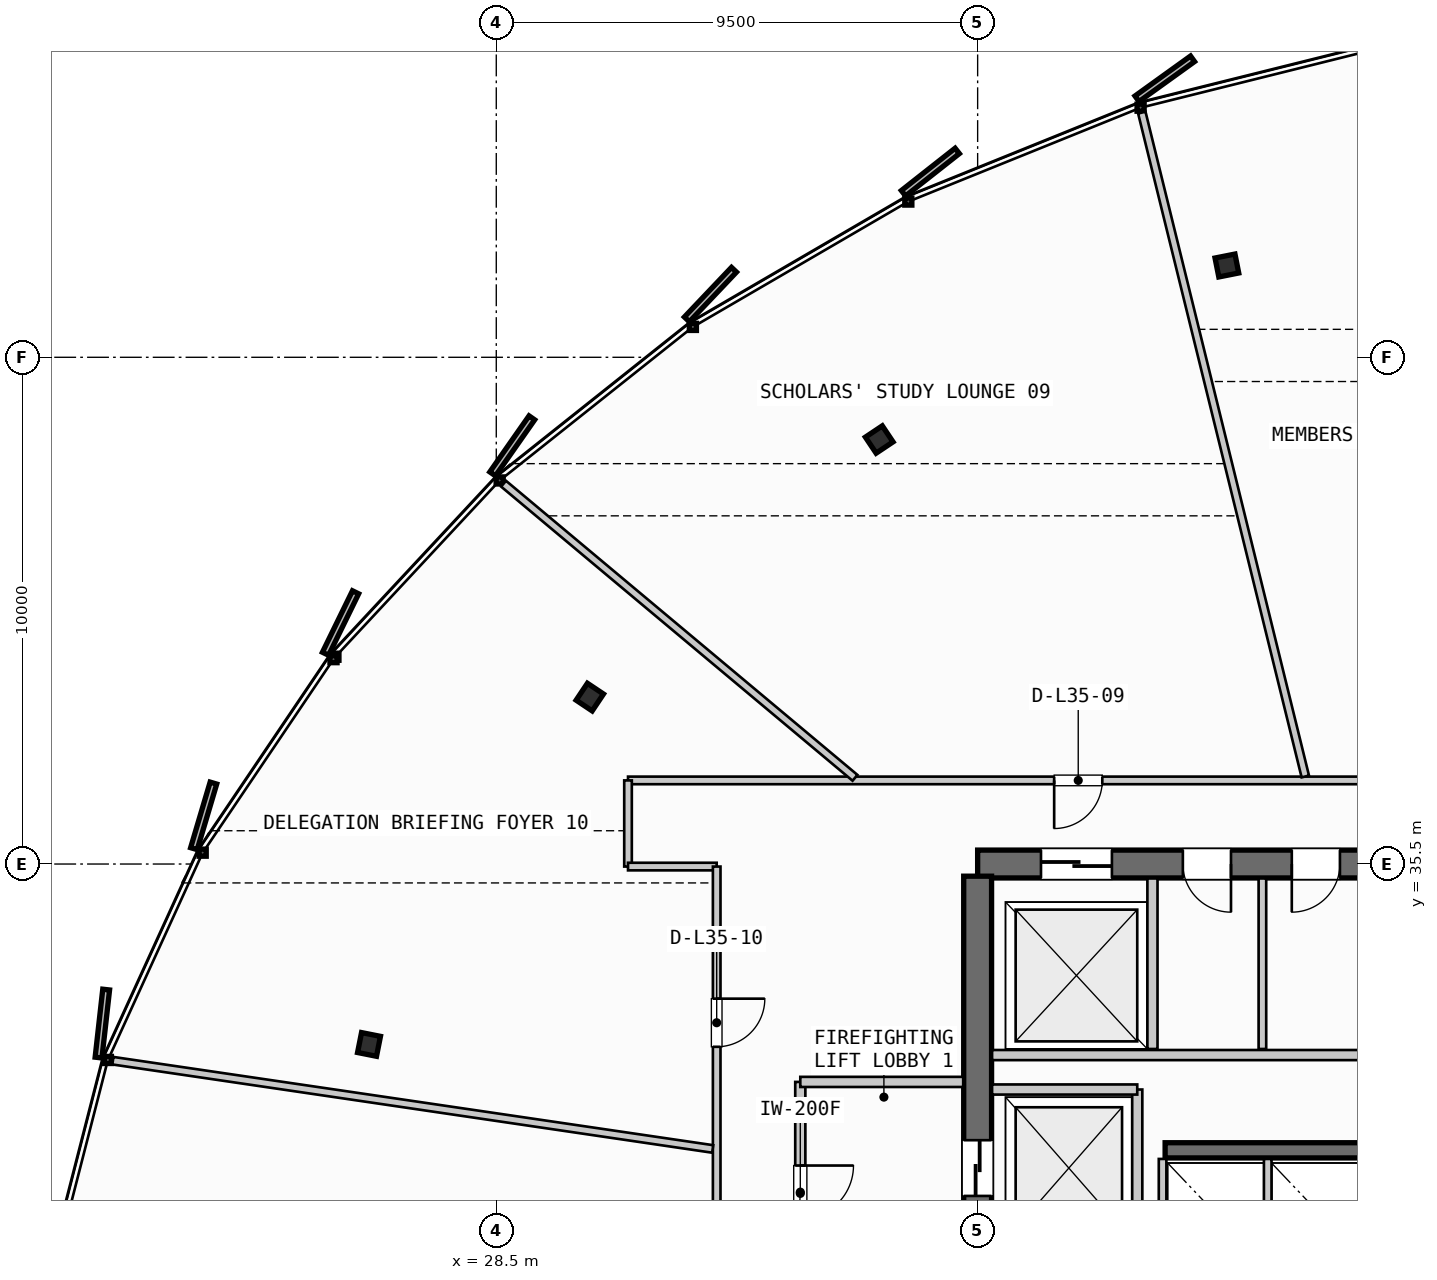
"""IFC4 building model, lengths in metres.
Left out: names, types, materials, properties, quantities, classifications, styles, units other than length and angle.
Written with IfcOpenShell. Run it as: python <this file> out.ifc"""

import sys

from ifc_helpers import new_model, si_unit, direction, frame, frame_2d, origin, origin_2d, place, context, subcontext, project, spatial, rectangle, i_section, extrude, source, transform, mapped, element, fill, save


model = new_model("IFC4")
c1 = context("Model", 3, precision=1e-05, world=origin(), true_north=direction((0.0, 1.0)))
c2 = subcontext(c1, "Body", "Model", "MODEL_VIEW")
j1 = project(units=[si_unit("LENGTHUNIT", "METRE"), si_unit("PLANEANGLEUNIT", "RADIAN")], contexts=[c1])
p1 = place(None, origin())
s1 = spatial("IfcSite", under=j1, at=p1, CompositionType="ELEMENT")
p2 = place(p1, origin())
s2 = spatial("IfcBuilding", under=s1, at=p2, CompositionType="ELEMENT")
p3 = place(p2, frame((0.0, 0.0, 139.45)))
s3 = spatial("IfcBuildingStorey", under=s2, at=p3, CompositionType="ELEMENT", Elevation=139.45)
p4 = place(p3, frame((55.6, 35.5, 0.0), z_axis=(0.0, 0.0, 1.0), x_axis=(-1.0, 0.0, 0.0)))
e1 = element("IfcWall", 1, at=p4, inside=s3, PredefinedType="SHEAR", context=c2, shape_type="SweptSolid", body=[
    extrude(rectangle(XDim=17.6, YDim=0.55, at=frame_2d((8.8, 0.0))), origin(), (0.0, 0.0, 1.0), 3.3),
])
p5 = place(p4, frame((8.05, 0.0, 0.0)))
e2 = element("IfcOpeningElement", 2, at=p5, cuts=e1, PredefinedType="OPENING", context=c2, shape_type="SweptSolid", body=[
    extrude(rectangle(XDim=1.5, YDim=2.2, at=frame_2d((0.75, 1.1))), frame((0.0, 0.285, 0.0), z_axis=(0.0, -1.0, 0.0), x_axis=(1.0, 0.0, 0.0)), (0.0, 0.0, 1.0), 0.57),
])
p6 = place(p4, frame((14.95, 0.0, 0.0)))
e3 = element("IfcOpeningElement", 3, at=p6, cuts=e1, PredefinedType="OPENING", context=c2, shape_type="SweptSolid", body=[
    extrude(rectangle(XDim=1.4, YDim=2.3, at=frame_2d((0.7, 1.15))), frame((0.0, 0.285, 0.0), z_axis=(0.0, -1.0, 0.0), x_axis=(1.0, 0.0, 0.0)), (0.0, 0.0, 1.0), 0.57),
])
p7 = place(p4, frame((12.6, 0.0, 0.0)))
e4 = element("IfcOpeningElement", 4, at=p7, cuts=e1, PredefinedType="OPENING", context=c2, shape_type="SweptSolid", body=[
    extrude(rectangle(XDim=0.95, YDim=2.15, at=frame_2d((0.475, 1.075))), frame((0.0, 0.285, 0.0), z_axis=(0.0, -1.0, 0.0), x_axis=(1.0, 0.0, 0.0)), (0.0, 0.0, 1.0), 0.57),
])
p8 = place(p4, frame((10.45, 0.0, 0.0)))
e5 = element("IfcOpeningElement", 5, at=p8, cuts=e1, PredefinedType="OPENING", context=c2, shape_type="SweptSolid", body=[
    extrude(rectangle(XDim=0.95, YDim=2.15, at=frame_2d((0.475, 1.075))), frame((0.0, 0.285, 0.0), z_axis=(0.0, -1.0, 0.0), x_axis=(1.0, 0.0, 0.0)), (0.0, 0.0, 1.0), 0.57),
])
p9 = place(p3, frame((38.0, 35.26, 0.0), z_axis=(0.0, 0.0, 1.0), x_axis=(0.0, -1.0, 0.0)))
e6 = element("IfcWall", 6, at=p9, inside=s3, PredefinedType="SHEAR", context=c2, shape_type="SweptSolid", body=[
    extrude(rectangle(XDim=14.92, YDim=0.55, at=frame_2d((7.46, 0.0))), origin(), (0.0, 0.0, 1.0), 3.3),
])
p10 = place(p9, frame((5.21, 0.0, 0.0)))
e7 = element("IfcOpeningElement", 7, at=p10, cuts=e6, PredefinedType="OPENING", context=c2, shape_type="SweptSolid", body=[
    extrude(rectangle(XDim=1.1, YDim=2.2, at=frame_2d((0.55, 1.1))), frame((0.0, 0.285, 0.0), z_axis=(0.0, -1.0, 0.0), x_axis=(1.0, 0.0, 0.0)), (0.0, 0.0, 1.0), 0.57),
])
p11 = place(p3, frame((41.7, 29.85, 0.0), z_axis=(0.0, 0.0, 1.0), x_axis=(1.0, 0.0, 0.0)))
e8 = element("IfcWall", 8, at=p11, inside=s3, PredefinedType="SHEAR", context=c2, shape_type="SweptSolid", body=[
    extrude(rectangle(XDim=4.25, YDim=0.3, at=frame_2d((2.125, 0.0))), origin(), (0.0, 0.0, 1.0), 3.3),
])
m1 = source(origin(), c2, "Body", "SweptSolid", [
    extrude(i_section(OverallWidth=0.401, OverallDepth=0.381, WebThickness=0.032, FlangeThickness=0.051, FilletRadius=0.015, at=origin_2d()), origin(), (0.0, 0.0, 1.0), 3.3),
])
for number, where, z_axis, x_axis in (
    (9, (42.919, 47.311, 0.0), (0.0, 0.0, 1.0), (-0.195, 0.981, 0.0)),
    (10, (36.058, 43.877, 0.0), (0.0, 0.0, 1.0), (-0.556, 0.831, 0.0)),
    (11, (30.346, 38.794, 0.0), (0.0, 0.0, 1.0), (-0.831, 0.556, 0.0)),
    (12, (25.989, 31.94, 0.0), (0.0, 0.0, 1.0), (-0.981, 0.195, 0.0)),
):
    element("IfcColumn", number, at=place(p3, frame(where, z_axis=z_axis, x_axis=x_axis)), inside=s3, PredefinedType="COLUMN", context=c2, shape_type="MappedRepresentation", body=[
        mapped(m1, transform((0.0, 0.0, 0.0), scale=1.0)),
    ])
p12 = place(p3, frame((41.15, 27.95, 0.0), z_axis=(0.0, 0.0, 1.0), x_axis=(0.0, 1.0, 0.0)))
e13 = element("IfcWall", 13, at=p12, inside=s3, PredefinedType="PARTITIONING", context=c2, shape_type="SweptSolid", body=[
    extrude(rectangle(XDim=3.1, YDim=0.2, at=frame_2d((1.55, 0.0))), origin(), (0.0, 0.0, 1.0), 2.305),
])
p13 = place(p3, frame((38.285, 31.05, 0.0), z_axis=(0.0, 0.0, 1.0), x_axis=(1.0, 0.0, 0.0)))
e14 = element("IfcWall", 14, at=p13, inside=s3, PredefinedType="PARTITIONING", context=c2, shape_type="SweptSolid", body=[
    extrude(rectangle(XDim=2.865, YDim=0.2, at=frame_2d((1.433, 0.0))), origin(), (0.0, 0.0, 1.0), 2.305),
])
p14 = place(p3, frame((34.5, 31.2, 0.0), z_axis=(0.0, 0.0, 1.0), x_axis=(0.0, -1.0, 0.0)))
e15 = element("IfcWall", 15, at=p14, inside=s3, PredefinedType="PARTITIONING", context=c2, shape_type="SweptSolid", body=[
    extrude(rectangle(XDim=4.4, YDim=0.2, at=frame_2d((2.2, 0.0))), origin(), (0.0, 0.0, 1.0), 2.305),
])
p15 = place(p14, frame((1.65, 0.0, 0.0)))
e16 = element("IfcOpeningElement", 16, at=p15, cuts=e15, PredefinedType="OPENING", context=c2, shape_type="SweptSolid", body=[
    extrude(rectangle(XDim=1.05, YDim=2.15, at=frame_2d((0.525, 1.075))), frame((0.0, 0.11, 0.0), z_axis=(0.0, -1.0, 0.0), x_axis=(1.0, 0.0, 0.0)), (0.0, 0.0, 1.0), 0.22),
])
p16 = place(p3, frame((34.5, 31.2, 0.0), z_axis=(0.0, 0.0, 1.0), x_axis=(1.0, 0.0, 0.0)))
e17 = element("IfcWall", 17, at=p16, inside=s3, PredefinedType="PARTITIONING", context=c2, shape_type="SweptSolid", body=[
    extrude(rectangle(XDim=3.215, YDim=0.2, at=frame_2d((1.607, 0.0))), origin(), (0.0, 0.0, 1.0), 2.305),
])
for number, where, z_axis, x_axis in (
    (18, (41.65, 27.41, 0.0), (0.0, 0.0, 1.0), (0.0, 1.0, 0.0)),
    (19, (43.725, 27.41, 0.0), (0.0, 0.0, 1.0), (0.0, 1.0, 0.0)),
):
    element("IfcWall", number, at=place(p3, frame(where, z_axis=z_axis, x_axis=x_axis)), inside=s3, PredefinedType="PARTITIONING", context=c2, shape_type="SweptSolid", body=[
        extrude(rectangle(XDim=2.27, YDim=0.15, at=frame_2d((1.135, 0.0))), origin(), (0.0, 0.0, 1.0), 2.305),
    ])
p17 = place(p3, frame((41.45, 31.85, 0.0), z_axis=(0.0, 0.0, 1.0), x_axis=(0.0, 1.0, 0.0)))
e20 = element("IfcWall", 20, at=p17, inside=s3, PredefinedType="PARTITIONING", context=c2, shape_type="SweptSolid", body=[
    extrude(rectangle(XDim=3.365, YDim=0.2, at=frame_2d((1.683, 0.0))), origin(), (0.0, 0.0, 1.0), 2.305),
])
p18 = place(p3, frame((38.285, 31.73, 0.0), z_axis=(0.0, 0.0, 1.0), x_axis=(1.0, 0.0, 0.0)))
e21 = element("IfcWall", 21, at=p18, inside=s3, PredefinedType="PARTITIONING", context=c2, shape_type="SweptSolid", body=[
    extrude(rectangle(XDim=7.515, YDim=0.2, at=frame_2d((3.758, 0.0))), origin(), (0.0, 0.0, 1.0), 2.305),
])
p19 = place(p3, frame((43.62, 31.85, 0.0), z_axis=(0.0, 0.0, 1.0), x_axis=(0.0, 1.0, 0.0)))
e22 = element("IfcWall", 22, at=p19, inside=s3, PredefinedType="PLUMBINGWALL", context=c2, shape_type="SweptSolid", body=[
    extrude(rectangle(XDim=3.365, YDim=0.15, at=frame_2d((1.683, 0.0))), origin(), (0.0, 0.0, 1.0), 2.305),
])
p20 = place(p3, frame((62.5, 37.15, 0.0), z_axis=(0.0, 0.0, 1.0), x_axis=(-1.0, 0.0, 0.0)))
e23 = element("IfcWall", 23, at=p20, inside=s3, PredefinedType="PARTITIONING", context=c2, shape_type="SweptSolid", body=[
    extrude(rectangle(XDim=31.4, YDim=0.15, at=frame_2d((15.7, 0.0))), origin(), (0.0, 0.0, 1.0), 2.305),
])
p21 = place(p20, frame((8.163, 0.0, 0.0)))
e24 = element("IfcOpeningElement", 24, at=p21, cuts=e23, PredefinedType="OPENING", context=c2, shape_type="SweptSolid", body=[
    extrude(rectangle(XDim=0.95, YDim=2.15, at=frame_2d((0.475, 1.075))), frame((0.0, 0.085, 0.0), z_axis=(0.0, -1.0, 0.0), x_axis=(1.0, 0.0, 0.0)), (0.0, 0.0, 1.0), 0.17),
])
p22 = place(p20, frame((14.62, 0.0, 0.0)))
e25 = element("IfcOpeningElement", 25, at=p22, cuts=e23, PredefinedType="OPENING", context=c2, shape_type="SweptSolid", body=[
    extrude(rectangle(XDim=0.95, YDim=2.15, at=frame_2d((0.475, 1.075))), frame((0.0, 0.085, 0.0), z_axis=(0.0, -1.0, 0.0), x_axis=(1.0, 0.0, 0.0)), (0.0, 0.0, 1.0), 0.17),
])
p23 = place(p20, frame((22.04, 0.0, 0.0)))
e26 = element("IfcOpeningElement", 26, at=p23, cuts=e23, PredefinedType="OPENING", context=c2, shape_type="SweptSolid", body=[
    extrude(rectangle(XDim=0.95, YDim=2.15, at=frame_2d((0.475, 1.075))), frame((0.0, 0.085, 0.0), z_axis=(0.0, -1.0, 0.0), x_axis=(1.0, 0.0, 0.0)), (0.0, 0.0, 1.0), 0.17),
])
p24 = place(p3, frame((31.1, 37.15, 0.0), z_axis=(0.0, 0.0, 1.0), x_axis=(0.0, -1.0, 0.0)))
e27 = element("IfcWall", 27, at=p24, inside=s3, PredefinedType="PARTITIONING", context=c2, shape_type="SweptSolid", body=[
    extrude(rectangle(XDim=1.7, YDim=0.15, at=frame_2d((0.85, 0.0))), origin(), (0.0, 0.0, 1.0), 2.305),
])
p25 = place(p3, frame((31.1, 35.45, 0.0), z_axis=(0.0, 0.0, 1.0), x_axis=(1.0, 0.0, 0.0)))
e28 = element("IfcWall", 28, at=p25, inside=s3, PredefinedType="PARTITIONING", context=c2, shape_type="SweptSolid", body=[
    extrude(rectangle(XDim=1.75, YDim=0.15, at=frame_2d((0.875, 0.0))), origin(), (0.0, 0.0, 1.0), 2.305),
])
p26 = place(p3, frame((32.85, 35.45, 0.0), z_axis=(0.0, 0.0, 1.0), x_axis=(0.0, -1.0, 0.0)))
e29 = element("IfcWall", 29, at=p26, inside=s3, PredefinedType="PARTITIONING", context=c2, shape_type="SweptSolid", body=[
    extrude(rectangle(XDim=15.3, YDim=0.15, at=frame_2d((7.65, 0.0))), origin(), (0.0, 0.0, 1.0), 2.305),
])
p27 = place(p26, frame((2.607, 0.0, 0.0)))
e30 = element("IfcOpeningElement", 30, at=p27, cuts=e29, PredefinedType="OPENING", context=c2, shape_type="SweptSolid", body=[
    extrude(rectangle(XDim=0.95, YDim=2.15, at=frame_2d((0.475, 1.075))), frame((0.0, 0.085, 0.0), z_axis=(0.0, -1.0, 0.0), x_axis=(1.0, 0.0, 0.0)), (0.0, 0.0, 1.0), 0.17),
])
p28 = place(p26, frame((9.676, 0.0, 0.0)))
e31 = element("IfcOpeningElement", 31, at=p28, cuts=e29, PredefinedType="OPENING", context=c2, shape_type="SweptSolid", body=[
    extrude(rectangle(XDim=0.95, YDim=2.15, at=frame_2d((0.475, 1.075))), frame((0.0, 0.085, 0.0), z_axis=(0.0, -1.0, 0.0), x_axis=(1.0, 0.0, 0.0)), (0.0, 0.0, 1.0), 0.17),
])
p29 = place(p3, frame((44.467, 37.228, 0.0), z_axis=(0.0, 0.0, 1.0), x_axis=(-0.239136633235, 0.97098592711, 0.0)))
e32 = element("IfcWall", 32, at=p29, inside=s3, PredefinedType="PARTITIONING", context=c2, shape_type="SweptSolid", body=[
    extrude(rectangle(XDim=13.492, YDim=0.15, at=frame_2d((6.746, 0.0))), origin(), (0.0, 0.0, 1.0), 2.305),
])
p30 = place(p3, frame((35.58, 37.201, 0.0), z_axis=(0.0, 0.0, 1.0), x_axis=(-0.766907520693, 0.641757629253, 0.0)))
e33 = element("IfcWall", 33, at=p30, inside=s3, PredefinedType="PARTITIONING", context=c2, shape_type="SweptSolid", body=[
    extrude(rectangle(XDim=9.044, YDim=0.15, at=frame_2d((4.522, 0.0))), origin(), (0.0, 0.0, 1.0), 2.305),
])
p31 = place(p3, frame((32.771, 29.877, 0.0), z_axis=(0.0, 0.0, 1.0), x_axis=(-0.98934824772, 0.145568007244, 0.0)))
e34 = element("IfcWall", 34, at=p31, inside=s3, PredefinedType="PARTITIONING", context=c2, shape_type="SweptSolid", body=[
    extrude(rectangle(XDim=11.965, YDim=0.15, at=frame_2d((5.982, 0.0))), origin(), (0.0, 0.0, 1.0), 2.305),
])
m2 = source(origin(), c2, "Body", "SweptSolid", [
    extrude(rectangle(XDim=1.1, YDim=2.2, at=frame_2d((0.55, 1.1))), frame((0.0, 0.025, 0.0), z_axis=(0.0, -1.0, 0.0), x_axis=(1.0, 0.0, 0.0)), (0.0, 0.0, 1.0), 0.05),
])
p32 = place(p10, origin())
e35 = element("IfcDoor", 35, at=p32, inside=s3, OperationType="SLIDING_TO_LEFT", PredefinedType="DOOR", context=c2, shape_type="MappedRepresentation", body=[
    mapped(m2, transform((0.0, 0.0, 0.0), scale=1.0)),
])
fill(e7, e35)
m3 = source(origin(), c2, "Body", "SweptSolid", [
    extrude(rectangle(XDim=1.4, YDim=2.3, at=frame_2d((0.7, 1.15))), frame((0.0, 0.025, 0.0), z_axis=(0.0, -1.0, 0.0), x_axis=(1.0, 0.0, 0.0)), (0.0, 0.0, 1.0), 0.05),
])
p33 = place(p6, origin())
e36 = element("IfcDoor", 36, at=p33, inside=s3, OperationType="SLIDING_TO_RIGHT", PredefinedType="DOOR", context=c2, shape_type="MappedRepresentation", body=[
    mapped(m3, transform((0.0, 0.0, 0.0), scale=1.0)),
])
fill(e3, e36)
m4 = source(origin(), c2, "Body", "SweptSolid", [
    extrude(rectangle(XDim=0.95, YDim=2.15, at=frame_2d((0.475, 1.075))), frame((0.0, 0.025, 0.0), z_axis=(0.0, -1.0, 0.0), x_axis=(1.0, 0.0, 0.0)), (0.0, 0.0, 1.0), 0.05),
])
p34 = place(p7, origin())
e37 = element("IfcDoor", 37, at=p34, inside=s3, OperationType="SINGLE_SWING_LEFT", PredefinedType="DOOR", context=c2, shape_type="MappedRepresentation", body=[
    mapped(m4, transform((0.0, 0.0, 0.0), scale=1.0)),
])
fill(e4, e37)
p35 = place(p8, origin())
e38 = element("IfcDoor", 38, at=p35, inside=s3, OperationType="SINGLE_SWING_RIGHT", PredefinedType="DOOR", context=c2, shape_type="MappedRepresentation", body=[
    mapped(m4, transform((0.0, 0.0, 0.0), scale=1.0)),
])
fill(e5, e38)
m5 = source(origin(), c2, "Body", "SweptSolid", [
    extrude(rectangle(XDim=1.05, YDim=2.15, at=frame_2d((0.525, 1.075))), frame((0.0, 0.025, 0.0), z_axis=(0.0, -1.0, 0.0), x_axis=(1.0, 0.0, 0.0)), (0.0, 0.0, 1.0), 0.05),
])
p36 = place(p15, origin())
e39 = element("IfcDoor", 39, at=p36, inside=s3, OperationType="SINGLE_SWING_LEFT", PredefinedType="DOOR", context=c2, shape_type="MappedRepresentation", body=[
    mapped(m5, transform((0.0, 0.0, 0.0), scale=1.0)),
])
fill(e16, e39)
p37 = place(p23, origin())
e40 = element("IfcDoor", 40, at=p37, inside=s3, OperationType="SINGLE_SWING_RIGHT", PredefinedType="DOOR", context=c2, shape_type="MappedRepresentation", body=[
    mapped(m4, transform((0.0, 0.0, 0.0), scale=1.0)),
])
fill(e26, e40)
p38 = place(p27, origin())
e41 = element("IfcDoor", 41, at=p38, inside=s3, OperationType="SINGLE_SWING_LEFT", PredefinedType="DOOR", context=c2, shape_type="MappedRepresentation", body=[
    mapped(m4, transform((0.0, 0.0, 0.0), scale=1.0)),
])
fill(e30, e41)
save(model, sys.argv[1])
